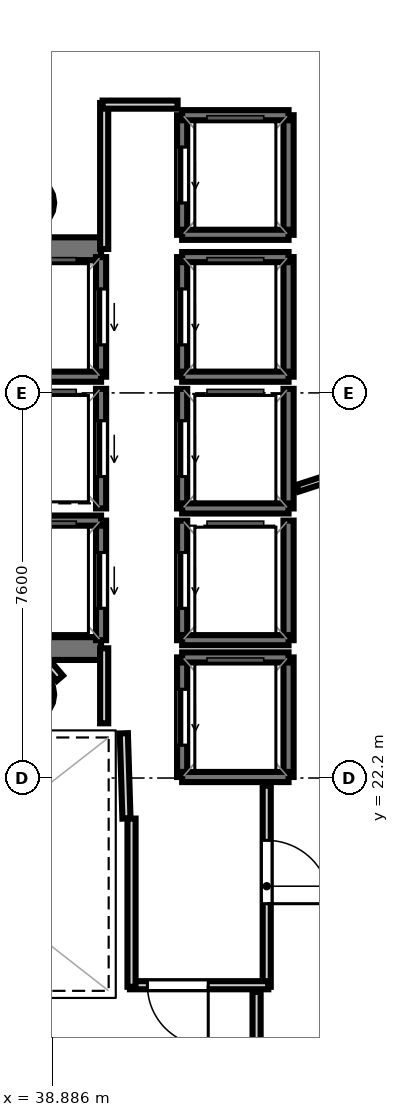
"""IFC4 building model, lengths in metres.
Left out: names, types, materials, properties, quantities, classifications, styles, units other than length and angle.
Written with IfcOpenShell. Run it as: python <this file> out.ifc"""

import sys

from ifc_helpers import new_model, si_unit, direction, frame, frame_2d, origin, origin_2d, place, context, subcontext, project, spatial, rectangle, hollow_circle, extrude, element, fill, save


model = new_model("IFC4")
c1 = context("Model", 3, precision=1e-05, world=origin(), true_north=direction((0.0, 1.0)))
c2 = subcontext(c1, "Body", "Model", "MODEL_VIEW")
j1 = project(units=[si_unit("LENGTHUNIT", "METRE"), si_unit("PLANEANGLEUNIT", "RADIAN")], contexts=[c1])
p1 = place(None, origin())
s1 = spatial("IfcSite", under=j1, at=p1, CompositionType="ELEMENT")
p2 = place(p1, origin())
s2 = spatial("IfcBuilding", under=s1, at=p2, CompositionType="ELEMENT")
p3 = place(p2, frame((0.0, 0.0, 234.5)))
s3 = spatial("IfcBuildingStorey", under=s2, at=p3, CompositionType="ELEMENT", Elevation=234.5)
p4 = place(p3, frame((29.33, 32.645, 0.0), z_axis=(0.0, 0.0, 1.0), x_axis=(1.0, 0.0, 0.0)))
e1 = element("IfcWall", 1, at=p4, inside=s3, PredefinedType="SHEAR", context=c2, shape_type="SweptSolid", body=[
    extrude(rectangle(XDim=10.52, YDim=0.45, at=frame_2d((5.26, 0.0))), origin(), (0.0, 0.0, 1.0), 4.32),
])
p5 = place(p4, frame((0.895, 0.0, 0.0)))
e2 = element("IfcOpeningElement", 2, at=p5, cuts=e1, PredefinedType="OPENING", context=c2, shape_type="SweptSolid", body=[
    extrude(rectangle(XDim=1.25, YDim=2.15, at=frame_2d((0.625, 1.075))), frame((0.0, 0.235, 0.0), z_axis=(0.0, -1.0, 0.0), x_axis=(1.0, 0.0, 0.0)), (0.0, 0.0, 1.0), 0.47),
])
p6 = place(p3, frame((29.33, 24.755, 0.0), z_axis=(0.0, 0.0, 1.0), x_axis=(1.0, 0.0, 0.0)))
e3 = element("IfcWall", 3, at=p6, inside=s3, PredefinedType="SHEAR", context=c2, shape_type="SweptSolid", body=[
    extrude(rectangle(XDim=10.52, YDim=0.45, at=frame_2d((5.26, 0.0))), origin(), (0.0, 0.0, 1.0), 4.32),
])
p7 = place(p6, frame((0.695, 0.0, 0.0)))
e4 = element("IfcOpeningElement", 4, at=p7, cuts=e3, PredefinedType="OPENING", context=c2, shape_type="SweptSolid", body=[
    extrude(rectangle(XDim=1.25, YDim=2.15, at=frame_2d((0.625, 1.075))), frame((0.0, 0.235, 0.0), z_axis=(0.0, -1.0, 0.0), x_axis=(1.0, 0.0, 0.0)), (0.0, 0.0, 1.0), 0.47),
])
for number, where, z_axis, x_axis in (
    (5, (38.4, 33.55, 0.0), (0.0, 0.0, 1.0), (1.0, 0.0, 0.0)),
    (6, (38.4, 23.85, 0.0), (0.0, 0.0, 1.0), (1.0, 0.0, 0.0)),
):
    element("IfcColumn", number, at=place(p3, frame(where, z_axis=z_axis, x_axis=x_axis)), inside=s3, PredefinedType="COLUMN", context=c2, shape_type="SweptSolid", body=[
        extrude(hollow_circle(Radius=0.525, WallThickness=0.028, at=origin_2d()), origin(), (0.0, 0.0, 1.0), 4.5),
    ])
p8 = place(p3, frame((39.85, 30.12, 0.0), z_axis=(0.0, 0.0, 1.0), x_axis=(0.0, 1.0, 0.0)))
e7 = element("IfcWall", 7, at=p8, inside=s3, PredefinedType="SOLIDWALL", context=c2, shape_type="SweptSolid", body=[
    extrude(rectangle(XDim=2.36, YDim=0.2, at=frame_2d((1.18, 0.0))), origin(), (0.0, 0.0, 1.0), 4.32),
])
p9 = place(p8, frame((0.63, 0.0, 0.0)))
e8 = element("IfcOpeningElement", 8, at=p9, cuts=e7, PredefinedType="OPENING", context=c2, shape_type="SweptSolid", body=[
    extrude(rectangle(XDim=1.1, YDim=2.15, at=frame_2d((0.55, 1.075))), frame((0.0, 0.11, 0.0), z_axis=(0.0, -1.0, 0.0), x_axis=(1.0, 0.0, 0.0)), (0.0, 0.0, 1.0), 0.22),
])
p10 = place(p3, frame((37.75, 30.12, 0.0), z_axis=(0.0, 0.0, 1.0), x_axis=(1.0, 0.0, 0.0)))
e9 = element("IfcWall", 9, at=p10, inside=s3, PredefinedType="SOLIDWALL", context=c2, shape_type="SweptSolid", body=[
    extrude(rectangle(XDim=2.1, YDim=0.2, at=frame_2d((1.05, 0.0))), origin(), (0.0, 0.0, 1.0), 4.32),
])
p11 = place(p3, frame((39.85, 24.92, 0.0), z_axis=(0.0, 0.0, 1.0), x_axis=(0.0, 1.0, 0.0)))
e10 = element("IfcWall", 10, at=p11, inside=s3, PredefinedType="SOLIDWALL", context=c2, shape_type="SweptSolid", body=[
    extrude(rectangle(XDim=2.36, YDim=0.2, at=frame_2d((1.18, 0.0))), origin(), (0.0, 0.0, 1.0), 4.32),
])
p12 = place(p11, frame((0.63, 0.0, 0.0)))
e11 = element("IfcOpeningElement", 11, at=p12, cuts=e10, PredefinedType="OPENING", context=c2, shape_type="SweptSolid", body=[
    extrude(rectangle(XDim=1.1, YDim=2.15, at=frame_2d((0.55, 1.075))), frame((0.0, 0.11, 0.0), z_axis=(0.0, -1.0, 0.0), x_axis=(1.0, 0.0, 0.0)), (0.0, 0.0, 1.0), 0.22),
])
p13 = place(p3, frame((37.75, 27.28, 0.0), z_axis=(0.0, 0.0, 1.0), x_axis=(1.0, 0.0, 0.0)))
e12 = element("IfcWall", 12, at=p13, inside=s3, PredefinedType="SOLIDWALL", context=c2, shape_type="SweptSolid", body=[
    extrude(rectangle(XDim=2.1, YDim=0.2, at=frame_2d((1.05, 0.0))), origin(), (0.0, 0.0, 1.0), 4.32),
])
p14 = place(p3, frame((43.55, 30.12, 0.0), z_axis=(0.0, 0.0, 1.0), x_axis=(0.0, 1.0, 0.0)))
e13 = element("IfcWall", 13, at=p14, inside=s3, PredefinedType="SOLIDWALL", context=c2, shape_type="SweptSolid", body=[
    extrude(rectangle(XDim=2.36, YDim=0.2, at=frame_2d((1.18, 0.0))), origin(), (0.0, 0.0, 1.0), 4.32),
])
p15 = place(p3, frame((41.45, 30.12, 0.0), z_axis=(0.0, 0.0, 1.0), x_axis=(0.0, 1.0, 0.0)))
e14 = element("IfcWall", 14, at=p15, inside=s3, PredefinedType="SOLIDWALL", context=c2, shape_type="SweptSolid", body=[
    extrude(rectangle(XDim=2.36, YDim=0.2, at=frame_2d((1.18, 0.0))), origin(), (0.0, 0.0, 1.0), 4.32),
])
p16 = place(p15, frame((0.63, 0.0, 0.0)))
e15 = element("IfcOpeningElement", 15, at=p16, cuts=e14, PredefinedType="OPENING", context=c2, shape_type="SweptSolid", body=[
    extrude(rectangle(XDim=1.1, YDim=2.15, at=frame_2d((0.55, 1.075))), frame((0.0, 0.11, 0.0), z_axis=(0.0, -1.0, 0.0), x_axis=(1.0, 0.0, 0.0)), (0.0, 0.0, 1.0), 0.22),
])
for number, where, z_axis, x_axis in (
    (16, (41.45, 32.48, 0.0), (0.0, 0.0, 1.0), (1.0, 0.0, 0.0)),
    (17, (41.45, 30.12, 0.0), (0.0, 0.0, 1.0), (1.0, 0.0, 0.0)),
):
    element("IfcWall", number, at=place(p3, frame(where, z_axis=z_axis, x_axis=x_axis)), inside=s3, PredefinedType="SOLIDWALL", context=c2, shape_type="SweptSolid", body=[
        extrude(rectangle(XDim=2.1, YDim=0.2, at=frame_2d((1.05, 0.0))), origin(), (0.0, 0.0, 1.0), 4.32),
    ])
p17 = place(p3, frame((43.55, 27.52, 0.0), z_axis=(0.0, 0.0, 1.0), x_axis=(0.0, 1.0, 0.0)))
e18 = element("IfcWall", 18, at=p17, inside=s3, PredefinedType="SOLIDWALL", context=c2, shape_type="SweptSolid", body=[
    extrude(rectangle(XDim=2.36, YDim=0.2, at=frame_2d((1.18, 0.0))), origin(), (0.0, 0.0, 1.0), 4.32),
])
p18 = place(p3, frame((41.45, 27.52, 0.0), z_axis=(0.0, 0.0, 1.0), x_axis=(0.0, 1.0, 0.0)))
e19 = element("IfcWall", 19, at=p18, inside=s3, PredefinedType="SOLIDWALL", context=c2, shape_type="SweptSolid", body=[
    extrude(rectangle(XDim=2.36, YDim=0.2, at=frame_2d((1.18, 0.0))), origin(), (0.0, 0.0, 1.0), 4.32),
])
p19 = place(p18, frame((0.63, 0.0, 0.0)))
e20 = element("IfcOpeningElement", 20, at=p19, cuts=e19, PredefinedType="OPENING", context=c2, shape_type="SweptSolid", body=[
    extrude(rectangle(XDim=1.1, YDim=2.15, at=frame_2d((0.55, 1.075))), frame((0.0, 0.11, 0.0), z_axis=(0.0, -1.0, 0.0), x_axis=(1.0, 0.0, 0.0)), (0.0, 0.0, 1.0), 0.22),
])
p20 = place(p3, frame((41.45, 27.52, 0.0), z_axis=(0.0, 0.0, 1.0), x_axis=(1.0, 0.0, 0.0)))
e21 = element("IfcWall", 21, at=p20, inside=s3, PredefinedType="SOLIDWALL", context=c2, shape_type="SweptSolid", body=[
    extrude(rectangle(XDim=2.1, YDim=0.2, at=frame_2d((1.05, 0.0))), origin(), (0.0, 0.0, 1.0), 4.32),
])
p21 = place(p3, frame((43.55, 24.92, 0.0), z_axis=(0.0, 0.0, 1.0), x_axis=(0.0, 1.0, 0.0)))
e22 = element("IfcWall", 22, at=p21, inside=s3, PredefinedType="SOLIDWALL", context=c2, shape_type="SweptSolid", body=[
    extrude(rectangle(XDim=2.36, YDim=0.2, at=frame_2d((1.18, 0.0))), origin(), (0.0, 0.0, 1.0), 4.32),
])
p22 = place(p3, frame((41.45, 24.92, 0.0), z_axis=(0.0, 0.0, 1.0), x_axis=(0.0, 1.0, 0.0)))
e23 = element("IfcWall", 23, at=p22, inside=s3, PredefinedType="SOLIDWALL", context=c2, shape_type="SweptSolid", body=[
    extrude(rectangle(XDim=2.36, YDim=0.2, at=frame_2d((1.18, 0.0))), origin(), (0.0, 0.0, 1.0), 4.32),
])
p23 = place(p22, frame((0.63, 0.0, 0.0)))
e24 = element("IfcOpeningElement", 24, at=p23, cuts=e23, PredefinedType="OPENING", context=c2, shape_type="SweptSolid", body=[
    extrude(rectangle(XDim=1.1, YDim=2.15, at=frame_2d((0.55, 1.075))), frame((0.0, 0.11, 0.0), z_axis=(0.0, -1.0, 0.0), x_axis=(1.0, 0.0, 0.0)), (0.0, 0.0, 1.0), 0.22),
])
p24 = place(p3, frame((41.45, 24.92, 0.0), z_axis=(0.0, 0.0, 1.0), x_axis=(1.0, 0.0, 0.0)))
e25 = element("IfcWall", 25, at=p24, inside=s3, PredefinedType="SOLIDWALL", context=c2, shape_type="SweptSolid", body=[
    extrude(rectangle(XDim=2.1, YDim=0.2, at=frame_2d((1.05, 0.0))), origin(), (0.0, 0.0, 1.0), 4.32),
])
p25 = place(p3, frame((39.85, 27.52, 0.0), z_axis=(0.0, 0.0, 1.0), x_axis=(0.0, 1.0, 0.0)))
e26 = element("IfcWall", 26, at=p25, inside=s3, PredefinedType="SOLIDWALL", context=c2, shape_type="SweptSolid", body=[
    extrude(rectangle(XDim=2.36, YDim=0.2, at=frame_2d((1.18, 0.0))), origin(), (0.0, 0.0, 1.0), 4.32),
])
p26 = place(p25, frame((0.63, 0.0, 0.0)))
e27 = element("IfcOpeningElement", 27, at=p26, cuts=e26, PredefinedType="OPENING", context=c2, shape_type="SweptSolid", body=[
    extrude(rectangle(XDim=1.1, YDim=2.15, at=frame_2d((0.55, 1.075))), frame((0.0, 0.11, 0.0), z_axis=(0.0, -1.0, 0.0), x_axis=(1.0, 0.0, 0.0)), (0.0, 0.0, 1.0), 0.22),
])
p27 = place(p3, frame((43.55, 22.22, 0.0), z_axis=(0.0, 0.0, 1.0), x_axis=(0.0, 1.0, 0.0)))
e28 = element("IfcWall", 28, at=p27, inside=s3, PredefinedType="SOLIDWALL", context=c2, shape_type="SweptSolid", body=[
    extrude(rectangle(XDim=2.36, YDim=0.2, at=frame_2d((1.18, 0.0))), origin(), (0.0, 0.0, 1.0), 4.32),
])
p28 = place(p3, frame((41.45, 22.22, 0.0), z_axis=(0.0, 0.0, 1.0), x_axis=(0.0, 1.0, 0.0)))
e29 = element("IfcWall", 29, at=p28, inside=s3, PredefinedType="SOLIDWALL", context=c2, shape_type="SweptSolid", body=[
    extrude(rectangle(XDim=2.36, YDim=0.2, at=frame_2d((1.18, 0.0))), origin(), (0.0, 0.0, 1.0), 4.32),
])
p29 = place(p28, frame((0.63, 0.0, 0.0)))
e30 = element("IfcOpeningElement", 30, at=p29, cuts=e29, PredefinedType="OPENING", context=c2, shape_type="SweptSolid", body=[
    extrude(rectangle(XDim=1.1, YDim=2.15, at=frame_2d((0.55, 1.075))), frame((0.0, 0.11, 0.0), z_axis=(0.0, -1.0, 0.0), x_axis=(1.0, 0.0, 0.0)), (0.0, 0.0, 1.0), 0.22),
])
for number, where, z_axis, x_axis in (
    (31, (41.45, 24.58, 0.0), (0.0, 0.0, 1.0), (1.0, 0.0, 0.0)),
    (32, (41.45, 22.22, 0.0), (0.0, 0.0, 1.0), (1.0, 0.0, 0.0)),
):
    element("IfcWall", number, at=place(p3, frame(where, z_axis=z_axis, x_axis=x_axis)), inside=s3, PredefinedType="SOLIDWALL", context=c2, shape_type="SweptSolid", body=[
        extrude(rectangle(XDim=2.1, YDim=0.2, at=frame_2d((1.05, 0.0))), origin(), (0.0, 0.0, 1.0), 4.32),
    ])
p30 = place(p3, frame((43.55, 32.92, 0.0), z_axis=(0.0, 0.0, 1.0), x_axis=(0.0, 1.0, 0.0)))
e33 = element("IfcWall", 33, at=p30, inside=s3, PredefinedType="SOLIDWALL", context=c2, shape_type="SweptSolid", body=[
    extrude(rectangle(XDim=2.36, YDim=0.2, at=frame_2d((1.18, 0.0))), origin(), (0.0, 0.0, 1.0), 4.32),
])
p31 = place(p3, frame((41.45, 32.92, 0.0), z_axis=(0.0, 0.0, 1.0), x_axis=(0.0, 1.0, 0.0)))
e34 = element("IfcWall", 34, at=p31, inside=s3, PredefinedType="SOLIDWALL", context=c2, shape_type="SweptSolid", body=[
    extrude(rectangle(XDim=2.36, YDim=0.2, at=frame_2d((1.18, 0.0))), origin(), (0.0, 0.0, 1.0), 4.32),
])
p32 = place(p31, frame((0.63, 0.0, 0.0)))
e35 = element("IfcOpeningElement", 35, at=p32, cuts=e34, PredefinedType="OPENING", context=c2, shape_type="SweptSolid", body=[
    extrude(rectangle(XDim=1.1, YDim=2.15, at=frame_2d((0.55, 1.075))), frame((0.0, 0.11, 0.0), z_axis=(0.0, -1.0, 0.0), x_axis=(1.0, 0.0, 0.0)), (0.0, 0.0, 1.0), 0.22),
])
for number, where, z_axis, x_axis in (
    (36, (41.45, 35.28, 0.0), (0.0, 0.0, 1.0), (1.0, 0.0, 0.0)),
    (37, (41.45, 32.92, 0.0), (0.0, 0.0, 1.0), (1.0, 0.0, 0.0)),
):
    element("IfcWall", number, at=place(p3, frame(where, z_axis=z_axis, x_axis=x_axis)), inside=s3, PredefinedType="SOLIDWALL", context=c2, shape_type="SweptSolid", body=[
        extrude(rectangle(XDim=2.1, YDim=0.2, at=frame_2d((1.05, 0.0))), origin(), (0.0, 0.0, 1.0), 4.32),
    ])
p33 = place(p3, frame((40.351, 21.401, 0.0), z_axis=(0.0, 0.0, 1.0), x_axis=(-0.031058045979, 0.999517582527, 0.0)))
e38 = element("IfcWall", 38, at=p33, inside=s3, PredefinedType="PARTITIONING", context=c2, shape_type="SweptSolid", body=[
    extrude(rectangle(XDim=1.682, YDim=0.16, at=frame_2d((0.841, 0.0))), origin(), (0.0, 0.0, 1.0), 3.64),
])
p34 = place(p3, frame((39.911, 23.28, 0.0), z_axis=(0.0, 0.0, 1.0), x_axis=(0.0, 1.0, 0.0)))
e39 = element("IfcWall", 39, at=p34, inside=s3, PredefinedType="PARTITIONING", context=c2, shape_type="SweptSolid", body=[
    extrude(rectangle(XDim=1.48, YDim=0.16, at=frame_2d((0.74, 0.0))), origin(), (0.0, 0.0, 1.0), 3.64),
])
p35 = place(p3, frame((39.911, 32.64, 0.0), z_axis=(0.0, 0.0, 1.0), x_axis=(0.0, 1.0, 0.0)))
e40 = element("IfcWall", 40, at=p35, inside=s3, PredefinedType="PARTITIONING", context=c2, shape_type="SweptSolid", body=[
    extrude(rectangle(XDim=2.88, YDim=0.16, at=frame_2d((1.44, 0.0))), origin(), (0.0, 0.0, 1.0), 3.64),
])
p36 = place(p3, frame((39.88, 35.489, 0.0), z_axis=(0.0, 0.0, 1.0), x_axis=(1.0, 0.0, 0.0)))
e41 = element("IfcWall", 41, at=p36, inside=s3, PredefinedType="PARTITIONING", context=c2, shape_type="SweptSolid", body=[
    extrude(rectangle(XDim=1.48, YDim=0.16, at=frame_2d((0.74, 0.0))), origin(), (0.0, 0.0, 1.0), 3.64),
])
p37 = place(p3, frame((43.119, 22.05, 0.0), z_axis=(0.0, 0.0, 1.0), x_axis=(0.0, -1.0, 0.0)))
e42 = element("IfcWall", 42, at=p37, inside=s3, PredefinedType="PARTITIONING", context=c2, shape_type="SweptSolid", body=[
    extrude(rectangle(XDim=3.97, YDim=0.16, at=frame_2d((1.985, 0.0))), origin(), (0.0, 0.0, 1.0), 3.64),
])
p38 = place(p37, frame((1.08, 0.0, 0.0)))
e43 = element("IfcOpeningElement", 43, at=p38, cuts=e42, PredefinedType="OPENING", context=c2, shape_type="SweptSolid", body=[
    extrude(rectangle(XDim=1.25, YDim=2.2, at=frame_2d((0.625, 1.1))), frame((0.0, 0.09, 0.0), z_axis=(0.0, -1.0, 0.0), x_axis=(1.0, 0.0, 0.0)), (0.0, 0.0, 1.0), 0.18),
])
p39 = place(p3, frame((43.15, 18.111, 0.0), z_axis=(0.0, 0.0, 1.0), x_axis=(-1.0, 0.0, 0.0)))
e44 = element("IfcWall", 44, at=p39, inside=s3, PredefinedType="PARTITIONING", context=c2, shape_type="SweptSolid", body=[
    extrude(rectangle(XDim=2.73, YDim=0.16, at=frame_2d((1.365, 0.0))), origin(), (0.0, 0.0, 1.0), 3.64),
])
p40 = place(p39, frame((1.185, 0.0, 0.0)))
e45 = element("IfcOpeningElement", 45, at=p40, cuts=e44, PredefinedType="OPENING", context=c2, shape_type="SweptSolid", body=[
    extrude(rectangle(XDim=1.2, YDim=2.15, at=frame_2d((0.6, 1.075))), frame((0.0, 0.09, 0.0), z_axis=(0.0, -1.0, 0.0), x_axis=(1.0, 0.0, 0.0)), (0.0, 0.0, 1.0), 0.18),
])
p41 = place(p3, frame((40.451, 18.08, 0.0), z_axis=(0.0, 0.0, 1.0), x_axis=(0.0, 1.0, 0.0)))
e46 = element("IfcWall", 46, at=p41, inside=s3, PredefinedType="PARTITIONING", context=c2, shape_type="SweptSolid", body=[
    extrude(rectangle(XDim=3.32, YDim=0.16, at=frame_2d((1.66, 0.0))), origin(), (0.0, 0.0, 1.0), 3.64),
])
p42 = place(p3, frame((39.036, 24.17, 0.0), z_axis=(0.0, 0.0, 1.0), x_axis=(-0.652260263346, 0.757995084984, 0.0)))
e47 = element("IfcWall", 47, at=p42, inside=s3, PredefinedType="PARTITIONING", context=c2, shape_type="SweptSolid", body=[
    extrude(rectangle(XDim=0.355, YDim=0.16, at=frame_2d((0.178, 0.0))), origin(), (0.0, 0.0, 1.0), 3.64),
])
p43 = place(p3, frame((42.919, 17.98, 0.0), z_axis=(0.0, 0.0, 1.0), x_axis=(0.0, -1.0, 0.0)))
e48 = element("IfcWall", 48, at=p43, inside=s3, PredefinedType="PARTITIONING", context=c2, shape_type="SweptSolid", body=[
    extrude(rectangle(XDim=2.714, YDim=0.16, at=frame_2d((1.357, 0.0))), origin(), (0.0, 0.0, 1.0), 3.64),
])
p44 = place(p3, frame((43.729, 27.918, 0.0), z_axis=(0.0, 0.0, 1.0), x_axis=(0.951056383536, 0.309017402966, 0.0)))
e49 = element("IfcWall", 49, at=p44, inside=s3, PredefinedType="PARTITIONING", context=c2, shape_type="SweptSolid", body=[
    extrude(rectangle(XDim=15.114, YDim=0.14, at=frame_2d((7.557, 0.0))), origin(), (0.0, 0.0, 1.0), 3.64),
])
p45 = place(p44, frame((6.932, 0.0, 0.0)))
e50 = element("IfcOpeningElement", 50, at=p45, cuts=e49, PredefinedType="OPENING", context=c2, shape_type="SweptSolid", body=[
    extrude(rectangle(XDim=1.25, YDim=2.2, at=frame_2d((0.625, 1.1))), frame((0.0, 0.08, 0.0), z_axis=(0.0, -1.0, 0.0), x_axis=(1.0, 0.0, 0.0)), (0.0, 0.0, 1.0), 0.16),
])
p46 = place(p9, origin())
e51 = element("IfcDoor", 51, at=p46, inside=s3, OperationType="SLIDING_TO_LEFT", PredefinedType="DOOR", context=c2, shape_type="SweptSolid", body=[
    extrude(rectangle(XDim=1.1, YDim=2.15, at=frame_2d((0.55, 1.075))), frame((0.0, 0.025, 0.0), z_axis=(0.0, -1.0, 0.0), x_axis=(1.0, 0.0, 0.0)), (0.0, 0.0, 1.0), 0.05),
])
fill(e8, e51)
p47 = place(p12, origin())
e52 = element("IfcDoor", 52, at=p47, inside=s3, OperationType="SLIDING_TO_LEFT", PredefinedType="DOOR", context=c2, shape_type="SweptSolid", body=[
    extrude(rectangle(XDim=1.1, YDim=2.15, at=frame_2d((0.55, 1.075))), frame((0.0, 0.025, 0.0), z_axis=(0.0, -1.0, 0.0), x_axis=(1.0, 0.0, 0.0)), (0.0, 0.0, 1.0), 0.05),
])
fill(e11, e52)
p48 = place(p16, origin())
e53 = element("IfcDoor", 53, at=p48, inside=s3, OperationType="SLIDING_TO_LEFT", PredefinedType="DOOR", context=c2, shape_type="SweptSolid", body=[
    extrude(rectangle(XDim=1.1, YDim=2.15, at=frame_2d((0.55, 1.075))), frame((0.0, 0.025, 0.0), z_axis=(0.0, -1.0, 0.0), x_axis=(1.0, 0.0, 0.0)), (0.0, 0.0, 1.0), 0.05),
])
fill(e15, e53)
p49 = place(p19, origin())
e54 = element("IfcDoor", 54, at=p49, inside=s3, OperationType="SLIDING_TO_LEFT", PredefinedType="DOOR", context=c2, shape_type="SweptSolid", body=[
    extrude(rectangle(XDim=1.1, YDim=2.15, at=frame_2d((0.55, 1.075))), frame((0.0, 0.025, 0.0), z_axis=(0.0, -1.0, 0.0), x_axis=(1.0, 0.0, 0.0)), (0.0, 0.0, 1.0), 0.05),
])
fill(e20, e54)
p50 = place(p23, origin())
e55 = element("IfcDoor", 55, at=p50, inside=s3, OperationType="SLIDING_TO_LEFT", PredefinedType="DOOR", context=c2, shape_type="SweptSolid", body=[
    extrude(rectangle(XDim=1.1, YDim=2.15, at=frame_2d((0.55, 1.075))), frame((0.0, 0.025, 0.0), z_axis=(0.0, -1.0, 0.0), x_axis=(1.0, 0.0, 0.0)), (0.0, 0.0, 1.0), 0.05),
])
fill(e24, e55)
p51 = place(p26, origin())
e56 = element("IfcDoor", 56, at=p51, inside=s3, OperationType="SLIDING_TO_LEFT", PredefinedType="DOOR", context=c2, shape_type="SweptSolid", body=[
    extrude(rectangle(XDim=1.1, YDim=2.15, at=frame_2d((0.55, 1.075))), frame((0.0, 0.025, 0.0), z_axis=(0.0, -1.0, 0.0), x_axis=(1.0, 0.0, 0.0)), (0.0, 0.0, 1.0), 0.05),
])
fill(e27, e56)
p52 = place(p29, origin())
e57 = element("IfcDoor", 57, at=p52, inside=s3, OperationType="SLIDING_TO_LEFT", PredefinedType="DOOR", context=c2, shape_type="SweptSolid", body=[
    extrude(rectangle(XDim=1.1, YDim=2.15, at=frame_2d((0.55, 1.075))), frame((0.0, 0.025, 0.0), z_axis=(0.0, -1.0, 0.0), x_axis=(1.0, 0.0, 0.0)), (0.0, 0.0, 1.0), 0.05),
])
fill(e30, e57)
p53 = place(p32, origin())
e58 = element("IfcDoor", 58, at=p53, inside=s3, OperationType="SLIDING_TO_LEFT", PredefinedType="DOOR", context=c2, shape_type="SweptSolid", body=[
    extrude(rectangle(XDim=1.1, YDim=2.15, at=frame_2d((0.55, 1.075))), frame((0.0, 0.025, 0.0), z_axis=(0.0, -1.0, 0.0), x_axis=(1.0, 0.0, 0.0)), (0.0, 0.0, 1.0), 0.05),
])
fill(e35, e58)
p54 = place(p40, origin())
e59 = element("IfcDoor", 59, at=p54, inside=s3, OperationType="SINGLE_SWING_LEFT", PredefinedType="DOOR", context=c2, shape_type="SweptSolid", body=[
    extrude(rectangle(XDim=1.2, YDim=2.15, at=frame_2d((0.6, 1.075))), frame((0.0, 0.025, 0.0), z_axis=(0.0, -1.0, 0.0), x_axis=(1.0, 0.0, 0.0)), (0.0, 0.0, 1.0), 0.05),
])
fill(e45, e59)
p55 = place(p38, origin())
e60 = element("IfcDoor", 60, at=p55, inside=s3, OperationType="SINGLE_SWING_RIGHT", PredefinedType="DOOR", context=c2, shape_type="SweptSolid", body=[
    extrude(rectangle(XDim=1.25, YDim=2.2, at=frame_2d((0.625, 1.1))), frame((0.0, 0.025, 0.0), z_axis=(0.0, -1.0, 0.0), x_axis=(1.0, 0.0, 0.0)), (0.0, 0.0, 1.0), 0.05),
])
fill(e43, e60)
save(model, sys.argv[1])
